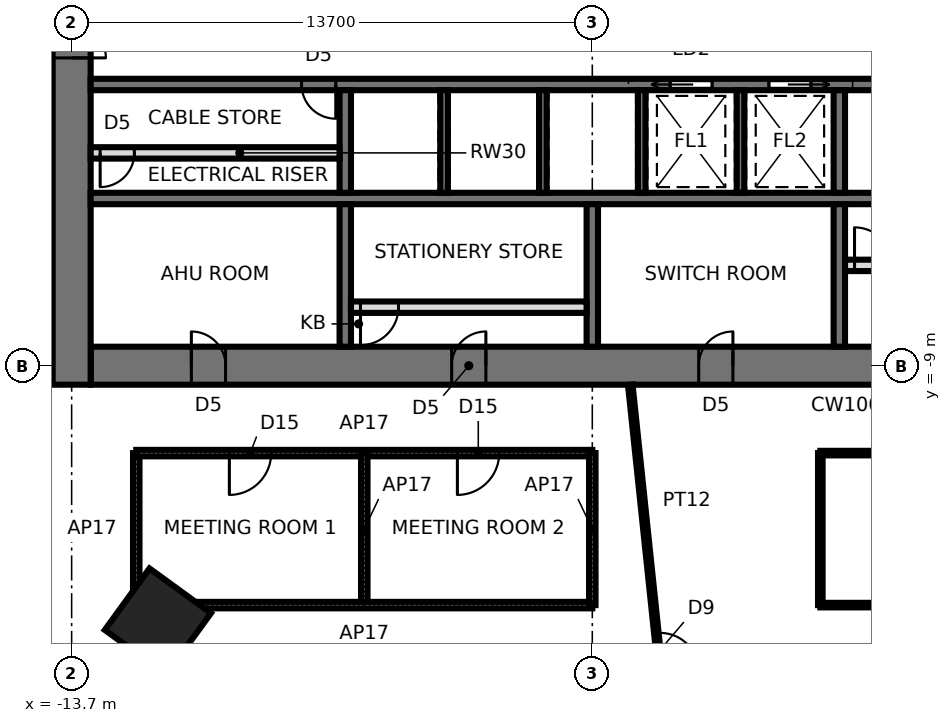
"""IFC4 building model, lengths in metres.
Left out: names, types, materials, properties, quantities, classifications, styles, units other than length and angle.
Written with IfcOpenShell. Run it as: python <this file> out.ifc"""

import sys

from ifc_helpers import new_model, si_unit, direction, frame, frame_2d, origin, origin_2d, place, context, subcontext, project, spatial, rectangle, extrude, element, fill, save


model = new_model("IFC4")
c1 = context("Model", 3, precision=1e-05, world=origin(), true_north=direction((0.0, 1.0)))
c2 = subcontext(c1, "Body", "Model", "MODEL_VIEW")
j1 = project(units=[si_unit("LENGTHUNIT", "METRE"), si_unit("PLANEANGLEUNIT", "RADIAN")], contexts=[c1])
p1 = place(None, origin())
s1 = spatial("IfcSite", under=j1, at=p1, CompositionType="ELEMENT")
p2 = place(p1, origin())
s2 = spatial("IfcBuilding", under=s1, at=p2, CompositionType="ELEMENT")
p3 = place(p2, frame((0.0, 0.0, 19.6)))
s3 = spatial("IfcBuildingStorey", under=s2, at=p3, CompositionType="ELEMENT", Elevation=19.6)
p4 = place(p3, frame((-11.43, -15.733, 0.0), z_axis=(0.0, 0.0, 1.0), x_axis=(-0.587785252292, -0.809016994375, 0.0)))
e1 = element("IfcColumn", 1, at=p4, inside=s3, PredefinedType="COLUMN", context=c2, shape_type="SweptSolid", body=[
    extrude(rectangle(XDim=2.0, YDim=2.0, at=origin_2d()), origin(), (0.0, 0.0, 1.0), 4.2),
])
p5 = place(p3, frame((-13.2, -9.0, 0.0), z_axis=(0.0, 0.0, 1.0), x_axis=(1.0, 0.0, 0.0)))
e2 = element("IfcWall", 2, at=p5, inside=s3, PredefinedType="SHEAR", context=c2, shape_type="SweptSolid", body=[
    extrude(rectangle(XDim=26.4, YDim=1.0, at=frame_2d((13.2, 0.0))), origin(), (0.0, 0.0, 1.0), 4.2),
])
p6 = place(p5, frame((2.65, 0.0, 0.0)))
e3 = element("IfcOpeningElement", 3, at=p6, cuts=e2, PredefinedType="OPENING", context=c2, shape_type="SweptSolid", body=[
    extrude(rectangle(XDim=0.9, YDim=2.1, at=frame_2d((0.45, 1.05))), frame((0.0, 0.51, 0.0), z_axis=(0.0, -1.0, 0.0), x_axis=(1.0, 0.0, 0.0)), (0.0, 0.0, 1.0), 1.02),
])
p7 = place(p5, frame((9.5, 0.0, 0.0)))
e4 = element("IfcOpeningElement", 4, at=p7, cuts=e2, PredefinedType="OPENING", context=c2, shape_type="SweptSolid", body=[
    extrude(rectangle(XDim=0.9, YDim=2.1, at=frame_2d((0.45, 1.05))), frame((0.0, 0.51, 0.0), z_axis=(0.0, -1.0, 0.0), x_axis=(1.0, 0.0, 0.0)), (0.0, 0.0, 1.0), 1.02),
])
p8 = place(p5, frame((16.0, 0.0, 0.0)))
e5 = element("IfcOpeningElement", 5, at=p8, cuts=e2, PredefinedType="OPENING", context=c2, shape_type="SweptSolid", body=[
    extrude(rectangle(XDim=0.9, YDim=2.1, at=frame_2d((0.45, 1.05))), frame((0.0, 0.51, 0.0), z_axis=(0.0, -1.0, 0.0), x_axis=(1.0, 0.0, 0.0)), (0.0, 0.0, 1.0), 1.02),
])
p9 = place(p5, frame((22.85, 0.0, 0.0)))
e6 = element("IfcOpeningElement", 6, at=p9, cuts=e2, PredefinedType="OPENING", context=c2, shape_type="SweptSolid", body=[
    extrude(rectangle(XDim=0.9, YDim=2.1, at=frame_2d((0.45, 1.05))), frame((0.0, 0.51, 0.0), z_axis=(0.0, -1.0, 0.0), x_axis=(1.0, 0.0, 0.0)), (0.0, 0.0, 1.0), 1.02),
])
p10 = place(p3, frame((-13.7, 9.5, 0.0), z_axis=(0.0, 0.0, 1.0), x_axis=(0.0, -1.0, 0.0)))
e7 = element("IfcWall", 7, at=p10, inside=s3, PredefinedType="SHEAR", context=c2, shape_type="SweptSolid", body=[
    extrude(rectangle(XDim=19.0, YDim=1.0, at=frame_2d((9.5, 0.0))), origin(), (0.0, 0.0, 1.0), 4.2),
])
p11 = place(p10, frame((8.6, 0.0, 0.0)))
e8 = element("IfcOpeningElement", 8, at=p11, cuts=e7, PredefinedType="OPENING", context=c2, shape_type="SweptSolid", body=[
    extrude(rectangle(XDim=1.8, YDim=2.4, at=frame_2d((0.9, 1.2))), frame((0.0, 0.51, 0.0), z_axis=(0.0, -1.0, 0.0), x_axis=(1.0, 0.0, 0.0)), (0.0, 0.0, 1.0), 1.02),
])
p12 = place(p3, frame((-13.2, -1.6, 0.0), z_axis=(0.0, 0.0, 1.0), x_axis=(1.0, 0.0, 0.0)))
e9 = element("IfcWall", 9, at=p12, inside=s3, PredefinedType="SHEAR", context=c2, shape_type="SweptSolid", body=[
    extrude(rectangle(XDim=26.4, YDim=0.3, at=frame_2d((13.2, 0.0))), origin(), (0.0, 0.0, 1.0), 4.2),
])
p13 = place(p12, frame((25.15, 0.0, 0.0)))
e10 = element("IfcOpeningElement", 10, at=p13, cuts=e9, PredefinedType="OPENING", context=c2, shape_type="SweptSolid", body=[
    extrude(rectangle(XDim=1.0, YDim=2.1, at=frame_2d((0.5, 1.05))), frame((0.0, 0.16, 0.0), z_axis=(0.0, -1.0, 0.0), x_axis=(1.0, 0.0, 0.0)), (0.0, 0.0, 1.0), 0.32),
])
p14 = place(p12, frame((15.25, 0.0, 0.0)))
e11 = element("IfcOpeningElement", 11, at=p14, cuts=e9, PredefinedType="OPENING", context=c2, shape_type="SweptSolid", body=[
    extrude(rectangle(XDim=1.1, YDim=2.3, at=frame_2d((0.55, 1.15))), frame((0.0, 0.16, 0.0), z_axis=(0.0, -1.0, 0.0), x_axis=(1.0, 0.0, 0.0)), (0.0, 0.0, 1.0), 0.32),
])
p15 = place(p12, frame((17.85, 0.0, 0.0)))
e12 = element("IfcOpeningElement", 12, at=p15, cuts=e9, PredefinedType="OPENING", context=c2, shape_type="SweptSolid", body=[
    extrude(rectangle(XDim=1.1, YDim=2.3, at=frame_2d((0.55, 1.15))), frame((0.0, 0.16, 0.0), z_axis=(0.0, -1.0, 0.0), x_axis=(1.0, 0.0, 0.0)), (0.0, 0.0, 1.0), 0.32),
])
p16 = place(p12, frame((5.55, 0.0, 0.0)))
e13 = element("IfcOpeningElement", 13, at=p16, cuts=e9, PredefinedType="OPENING", context=c2, shape_type="SweptSolid", body=[
    extrude(rectangle(XDim=0.9, YDim=2.1, at=frame_2d((0.45, 1.05))), frame((0.0, 0.16, 0.0), z_axis=(0.0, -1.0, 0.0), x_axis=(1.0, 0.0, 0.0)), (0.0, 0.0, 1.0), 0.32),
])
p17 = place(p3, frame((-13.2, -4.6, 0.0), z_axis=(0.0, 0.0, 1.0), x_axis=(1.0, 0.0, 0.0)))
e14 = element("IfcWall", 14, at=p17, inside=s3, PredefinedType="SHEAR", context=c2, shape_type="SweptSolid", body=[
    extrude(rectangle(XDim=26.4, YDim=0.3, at=frame_2d((13.2, 0.0))), origin(), (0.0, 0.0, 1.0), 4.2),
])
p18 = place(p3, frame((-6.5, -1.75, 0.0), z_axis=(0.0, 0.0, 1.0), x_axis=(0.0, -1.0, 0.0)))
e15 = element("IfcWall", 15, at=p18, inside=s3, PredefinedType="SHEAR", context=c2, shape_type="SweptSolid", body=[
    extrude(rectangle(XDim=2.7, YDim=0.3, at=frame_2d((1.35, 0.0))), origin(), (0.0, 0.0, 1.0), 4.2),
])
p19 = place(p3, frame((-6.5, -4.75, 0.0), z_axis=(0.0, 0.0, 1.0), x_axis=(0.0, -1.0, 0.0)))
e16 = element("IfcWall", 16, at=p19, inside=s3, PredefinedType="SHEAR", context=c2, shape_type="SweptSolid", body=[
    extrude(rectangle(XDim=3.75, YDim=0.3, at=frame_2d((1.875, 0.0))), origin(), (0.0, 0.0, 1.0), 4.2),
])
p20 = place(p3, frame((6.5, -1.75, 0.0), z_axis=(0.0, 0.0, 1.0), x_axis=(0.0, -1.0, 0.0)))
e17 = element("IfcWall", 17, at=p20, inside=s3, PredefinedType="SHEAR", context=c2, shape_type="SweptSolid", body=[
    extrude(rectangle(XDim=2.7, YDim=0.3, at=frame_2d((1.35, 0.0))), origin(), (0.0, 0.0, 1.0), 4.2),
])
p21 = place(p3, frame((6.5, -4.75, 0.0), z_axis=(0.0, 0.0, 1.0), x_axis=(0.0, -1.0, 0.0)))
e18 = element("IfcWall", 18, at=p21, inside=s3, PredefinedType="SHEAR", context=c2, shape_type="SweptSolid", body=[
    extrude(rectangle(XDim=3.75, YDim=0.3, at=frame_2d((1.875, 0.0))), origin(), (0.0, 0.0, 1.0), 4.2),
])
for number, where, z_axis, x_axis in (
    (19, (-3.9, -1.75, 0.0), (0.0, 0.0, 1.0), (0.0, -1.0, 0.0)),
    (20, (-1.3, -1.75, 0.0), (0.0, 0.0, 1.0), (0.0, -1.0, 0.0)),
    (21, (1.3, -1.75, 0.0), (0.0, 0.0, 1.0), (0.0, -1.0, 0.0)),
    (22, (3.9, -1.75, 0.0), (0.0, 0.0, 1.0), (0.0, -1.0, 0.0)),
):
    element("IfcWall", number, at=place(p3, frame(where, z_axis=z_axis, x_axis=x_axis)), inside=s3, PredefinedType="SHEAR", context=c2, shape_type="SweptSolid", body=[
        extrude(rectangle(XDim=2.7, YDim=0.2, at=frame_2d((1.35, 0.0))), origin(), (0.0, 0.0, 1.0), 4.2),
    ])
p22 = place(p3, frame((0.0, -4.75, 0.0), z_axis=(0.0, 0.0, 1.0), x_axis=(0.0, -1.0, 0.0)))
e23 = element("IfcWall", 23, at=p22, inside=s3, PredefinedType="SHEAR", context=c2, shape_type="SweptSolid", body=[
    extrude(rectangle(XDim=3.75, YDim=0.3, at=frame_2d((1.875, 0.0))), origin(), (0.0, 0.0, 1.0), 4.2),
])
p23 = place(p3, frame((-6.35, -7.46, 0.0), z_axis=(0.0, 0.0, 1.0), x_axis=(1.0, 0.0, 0.0)))
e24 = element("IfcWall", 24, at=p23, inside=s3, PredefinedType="PARTITIONING", context=c2, shape_type="SweptSolid", body=[
    extrude(rectangle(XDim=6.2, YDim=0.3, at=frame_2d((3.1, 0.0))), origin(), (0.0, 0.0, 1.0), 4.04),
])
p24 = place(p23, frame((0.25, 0.0, 0.0)))
e25 = element("IfcOpeningElement", 25, at=p24, cuts=e24, PredefinedType="OPENING", context=c2, shape_type="SweptSolid", body=[
    extrude(rectangle(XDim=1.0, YDim=2.4, at=frame_2d((0.5, 1.2))), frame((0.0, 0.16, 0.0), z_axis=(0.0, -1.0, 0.0), x_axis=(1.0, 0.0, 0.0)), (0.0, 0.0, 1.0), 0.32),
])
p25 = place(p3, frame((6.65, -6.36, 0.0), z_axis=(0.0, 0.0, 1.0), x_axis=(1.0, 0.0, 0.0)))
e26 = element("IfcWall", 26, at=p25, inside=s3, PredefinedType="PARTITIONING", context=c2, shape_type="SweptSolid", body=[
    extrude(rectangle(XDim=6.55, YDim=0.3, at=frame_2d((3.275, 0.0))), origin(), (0.0, 0.0, 1.0), 4.04),
])
p26 = place(p25, frame((0.25, 0.0, 0.0)))
e27 = element("IfcOpeningElement", 27, at=p26, cuts=e26, PredefinedType="OPENING", context=c2, shape_type="SweptSolid", body=[
    extrude(rectangle(XDim=1.0, YDim=2.4, at=frame_2d((0.5, 1.2))), frame((0.0, 0.16, 0.0), z_axis=(0.0, -1.0, 0.0), x_axis=(1.0, 0.0, 0.0)), (0.0, 0.0, 1.0), 0.32),
])
p27 = place(p3, frame((-13.2, -3.4, 0.0), z_axis=(0.0, 0.0, 1.0), x_axis=(1.0, 0.0, 0.0)))
e28 = element("IfcWall", 28, at=p27, inside=s3, PredefinedType="SOLIDWALL", context=c2, shape_type="SweptSolid", body=[
    extrude(rectangle(XDim=6.55, YDim=0.3, at=frame_2d((3.275, 0.0))), origin(), (0.0, 0.0, 1.0), 4.04),
])
p28 = place(p27, frame((0.25, 0.0, 0.0)))
e29 = element("IfcOpeningElement", 29, at=p28, cuts=e28, PredefinedType="OPENING", context=c2, shape_type="SweptSolid", body=[
    extrude(rectangle(XDim=0.9, YDim=2.1, at=frame_2d((0.45, 1.05))), frame((0.0, 0.16, 0.0), z_axis=(0.0, -1.0, 0.0), x_axis=(1.0, 0.0, 0.0)), (0.0, 0.0, 1.0), 0.32),
])
p29 = place(p3, frame((-12.0, -15.3, 0.0), z_axis=(0.0, 0.0, 1.0), x_axis=(0.0, 1.0, 0.0)))
e30 = element("IfcWall", 30, at=p29, inside=s3, PredefinedType="PARTITIONING", context=c2, shape_type="SweptSolid", body=[
    extrude(rectangle(XDim=4.0, YDim=0.17, at=frame_2d((2.0, 0.0))), origin(), (0.0, 0.0, 1.0), 4.04),
])
p30 = place(p3, frame((-12.0, -11.3, 0.0), z_axis=(0.0, 0.0, 1.0), x_axis=(1.0, 0.0, 0.0)))
e31 = element("IfcWall", 31, at=p30, inside=s3, PredefinedType="PARTITIONING", context=c2, shape_type="SweptSolid", body=[
    extrude(rectangle(XDim=12.0, YDim=0.17, at=frame_2d((6.0, 0.0))), origin(), (0.0, 0.0, 1.0), 4.04),
])
p31 = place(p30, frame((2.45, 0.0, 0.0)))
e32 = element("IfcOpeningElement", 32, at=p31, cuts=e31, PredefinedType="OPENING", context=c2, shape_type="SweptSolid", body=[
    extrude(rectangle(XDim=1.1, YDim=2.4, at=frame_2d((0.55, 1.2))), frame((0.0, 0.095, 0.0), z_axis=(0.0, -1.0, 0.0), x_axis=(1.0, 0.0, 0.0)), (0.0, 0.0, 1.0), 0.19),
])
p32 = place(p30, frame((8.45, 0.0, 0.0)))
e33 = element("IfcOpeningElement", 33, at=p32, cuts=e31, PredefinedType="OPENING", context=c2, shape_type="SweptSolid", body=[
    extrude(rectangle(XDim=1.1, YDim=2.4, at=frame_2d((0.55, 1.2))), frame((0.0, 0.095, 0.0), z_axis=(0.0, -1.0, 0.0), x_axis=(1.0, 0.0, 0.0)), (0.0, 0.0, 1.0), 0.19),
])
p33 = place(p3, frame((-6.0, -11.3, 0.0), z_axis=(0.0, 0.0, 1.0), x_axis=(0.0, -1.0, 0.0)))
e34 = element("IfcWall", 34, at=p33, inside=s3, PredefinedType="PARTITIONING", context=c2, shape_type="SweptSolid", body=[
    extrude(rectangle(XDim=4.0, YDim=0.17, at=frame_2d((2.0, 0.0))), origin(), (0.0, 0.0, 1.0), 4.04),
])
p34 = place(p3, frame((0.0, -15.3, 0.0), z_axis=(0.0, 0.0, 1.0), x_axis=(-1.0, 0.0, 0.0)))
e35 = element("IfcWall", 35, at=p34, inside=s3, PredefinedType="PARTITIONING", context=c2, shape_type="SweptSolid", body=[
    extrude(rectangle(XDim=12.0, YDim=0.17, at=frame_2d((6.0, 0.0))), origin(), (0.0, 0.0, 1.0), 3.586),
])
p35 = place(p3, frame((0.0, -11.3, 0.0), z_axis=(0.0, 0.0, 1.0), x_axis=(0.0, -1.0, 0.0)))
e36 = element("IfcWall", 36, at=p35, inside=s3, PredefinedType="PARTITIONING", context=c2, shape_type="SweptSolid", body=[
    extrude(rectangle(XDim=4.0, YDim=0.17, at=frame_2d((2.0, 0.0))), origin(), (0.0, 0.0, 1.0), 2.84),
])
p36 = place(p3, frame((2.472, -23.521, 0.0), z_axis=(0.0, 0.0, 1.0), x_axis=(-0.104529730385, 0.994521762188, 0.0)))
e37 = element("IfcWall", 37, at=p36, inside=s3, PredefinedType="PARTITIONING", context=c2, shape_type="SweptSolid", body=[
    extrude(rectangle(XDim=14.098, YDim=0.12, at=frame_2d((7.049, 0.0))), origin(), (0.0, 0.0, 1.0), 4.04),
])
p37 = place(p36, frame((6.524, 0.0, 0.0)))
e38 = element("IfcOpeningElement", 38, at=p37, cuts=e37, PredefinedType="OPENING", context=c2, shape_type="SweptSolid", body=[
    extrude(rectangle(XDim=1.0, YDim=2.4, at=frame_2d((0.5, 1.2))), frame((0.0, 0.07, 0.0), z_axis=(0.0, -1.0, 0.0), x_axis=(1.0, 0.0, 0.0)), (0.0, 0.0, 1.0), 0.14),
])
p38 = place(p3, frame((6.0, -15.3, 0.0), z_axis=(0.0, 0.0, 1.0), x_axis=(0.0, 1.0, 0.0)))
e39 = element("IfcWall", 39, at=p38, inside=s3, PredefinedType="PARTITIONING", context=c2, shape_type="SweptSolid", body=[
    extrude(rectangle(XDim=4.0, YDim=0.12, at=frame_2d((2.0, 0.0))), origin(), (0.0, 0.0, 1.0), 4.04),
])
p39 = place(p3, frame((12.0, -15.3, 0.0), z_axis=(0.0, 0.0, 1.0), x_axis=(-1.0, 0.0, 0.0)))
e40 = element("IfcWall", 40, at=p39, inside=s3, PredefinedType="PARTITIONING", context=c2, shape_type="SweptSolid", body=[
    extrude(rectangle(XDim=6.0, YDim=0.12, at=frame_2d((3.0, 0.0))), origin(), (0.0, 0.0, 1.0), 4.04),
])
p40 = place(p39, frame((2.5, 0.0, 0.0)))
e41 = element("IfcOpeningElement", 41, at=p40, cuts=e40, PredefinedType="OPENING", context=c2, shape_type="SweptSolid", body=[
    extrude(rectangle(XDim=1.0, YDim=2.4, at=frame_2d((0.5, 1.2))), frame((0.0, 0.07, 0.0), z_axis=(0.0, -1.0, 0.0), x_axis=(1.0, 0.0, 0.0)), (0.0, 0.0, 1.0), 0.14),
])
p41 = place(p3, frame((6.0, -11.3, 0.0), z_axis=(0.0, 0.0, 1.0), x_axis=(1.0, 0.0, 0.0)))
e42 = element("IfcWall", 42, at=p41, inside=s3, PredefinedType="PARTITIONING", context=c2, shape_type="SweptSolid", body=[
    extrude(rectangle(XDim=6.0, YDim=0.12, at=frame_2d((3.0, 0.0))), origin(), (0.0, 0.0, 1.0), 4.04),
])
p42 = place(p11, origin())
e43 = element("IfcDoor", 43, at=p42, inside=s3, OperationType="DOUBLE_DOOR_SINGLE_SWING", PredefinedType="DOOR", context=c2, shape_type="SweptSolid", body=[
    extrude(rectangle(XDim=1.72, YDim=2.36, at=frame_2d((0.9, 1.18))), frame((0.0, 0.025, 0.0), z_axis=(0.0, -1.0, 0.0), x_axis=(1.0, 0.0, 0.0)), (0.0, 0.0, 1.0), 0.05),
    extrude(rectangle(XDim=0.04, YDim=2.4, at=frame_2d((0.02, 1.2))), frame((0.0, 0.25, 0.0), z_axis=(0.0, -1.0, 0.0), x_axis=(1.0, 0.0, 0.0)), (0.0, 0.0, 1.0), 0.5),
    extrude(rectangle(XDim=0.04, YDim=2.4, at=frame_2d((1.78, 1.2))), frame((0.0, 0.25, 0.0), z_axis=(0.0, -1.0, 0.0), x_axis=(1.0, 0.0, 0.0)), (0.0, 0.0, 1.0), 0.5),
    extrude(rectangle(XDim=1.72, YDim=0.04, at=frame_2d((0.9, 2.38))), frame((0.0, 0.25, 0.0), z_axis=(0.0, -1.0, 0.0), x_axis=(1.0, 0.0, 0.0)), (0.0, 0.0, 1.0), 0.5),
])
fill(e8, e43)
p43 = place(p14, frame((1.1, 0.0, 0.0), z_axis=(0.0, 0.0, 1.0), x_axis=(-1.0, 0.0, 0.0)))
e44 = element("IfcDoor", 44, at=p43, inside=s3, OperationType="SLIDING_TO_RIGHT", PredefinedType="DOOR", context=c2, shape_type="SweptSolid", body=[
    extrude(rectangle(XDim=1.1, YDim=2.3, at=frame_2d((0.55, 1.15))), frame((0.0, 0.025, 0.0), z_axis=(0.0, -1.0, 0.0), x_axis=(1.0, 0.0, 0.0)), (0.0, 0.0, 1.0), 0.05),
])
fill(e11, e44)
p44 = place(p15, frame((1.1, 0.0, 0.0), z_axis=(0.0, 0.0, 1.0), x_axis=(-1.0, 0.0, 0.0)))
e45 = element("IfcDoor", 45, at=p44, inside=s3, OperationType="SLIDING_TO_LEFT", PredefinedType="DOOR", context=c2, shape_type="SweptSolid", body=[
    extrude(rectangle(XDim=1.1, YDim=2.3, at=frame_2d((0.55, 1.15))), frame((0.0, 0.025, 0.0), z_axis=(0.0, -1.0, 0.0), x_axis=(1.0, 0.0, 0.0)), (0.0, 0.0, 1.0), 0.05),
])
fill(e12, e45)
p45 = place(p16, frame((0.9, 0.0, 0.0), z_axis=(0.0, 0.0, 1.0), x_axis=(-1.0, 0.0, 0.0)))
e46 = element("IfcDoor", 46, at=p45, inside=s3, OperationType="SINGLE_SWING_LEFT", PredefinedType="DOOR", context=c2, shape_type="SweptSolid", body=[
    extrude(rectangle(XDim=0.9, YDim=2.1, at=frame_2d((0.45, 1.05))), frame((0.0, 0.025, 0.0), z_axis=(0.0, -1.0, 0.0), x_axis=(1.0, 0.0, 0.0)), (0.0, 0.0, 1.0), 0.05),
])
fill(e13, e46)
p46 = place(p6, origin())
e47 = element("IfcDoor", 47, at=p46, inside=s3, OperationType="SINGLE_SWING_LEFT", PredefinedType="DOOR", context=c2, shape_type="SweptSolid", body=[
    extrude(rectangle(XDim=0.82, YDim=2.06, at=frame_2d((0.45, 1.03))), frame((0.0, 0.025, 0.0), z_axis=(0.0, -1.0, 0.0), x_axis=(1.0, 0.0, 0.0)), (0.0, 0.0, 1.0), 0.05),
    extrude(rectangle(XDim=0.04, YDim=2.1, at=frame_2d((0.02, 1.05))), frame((0.0, 0.25, 0.0), z_axis=(0.0, -1.0, 0.0), x_axis=(1.0, 0.0, 0.0)), (0.0, 0.0, 1.0), 0.5),
    extrude(rectangle(XDim=0.04, YDim=2.1, at=frame_2d((0.88, 1.05))), frame((0.0, 0.25, 0.0), z_axis=(0.0, -1.0, 0.0), x_axis=(1.0, 0.0, 0.0)), (0.0, 0.0, 1.0), 0.5),
    extrude(rectangle(XDim=0.82, YDim=0.04, at=frame_2d((0.45, 2.08))), frame((0.0, 0.25, 0.0), z_axis=(0.0, -1.0, 0.0), x_axis=(1.0, 0.0, 0.0)), (0.0, 0.0, 1.0), 0.5),
])
fill(e3, e47)
p47 = place(p7, origin())
e48 = element("IfcDoor", 48, at=p47, inside=s3, OperationType="SINGLE_SWING_RIGHT", PredefinedType="DOOR", context=c2, shape_type="SweptSolid", body=[
    extrude(rectangle(XDim=0.82, YDim=2.06, at=frame_2d((0.45, 1.03))), frame((0.0, 0.025, 0.0), z_axis=(0.0, -1.0, 0.0), x_axis=(1.0, 0.0, 0.0)), (0.0, 0.0, 1.0), 0.05),
    extrude(rectangle(XDim=0.04, YDim=2.1, at=frame_2d((0.02, 1.05))), frame((0.0, 0.25, 0.0), z_axis=(0.0, -1.0, 0.0), x_axis=(1.0, 0.0, 0.0)), (0.0, 0.0, 1.0), 0.5),
    extrude(rectangle(XDim=0.04, YDim=2.1, at=frame_2d((0.88, 1.05))), frame((0.0, 0.25, 0.0), z_axis=(0.0, -1.0, 0.0), x_axis=(1.0, 0.0, 0.0)), (0.0, 0.0, 1.0), 0.5),
    extrude(rectangle(XDim=0.82, YDim=0.04, at=frame_2d((0.45, 2.08))), frame((0.0, 0.25, 0.0), z_axis=(0.0, -1.0, 0.0), x_axis=(1.0, 0.0, 0.0)), (0.0, 0.0, 1.0), 0.5),
])
fill(e4, e48)
p48 = place(p8, origin())
e49 = element("IfcDoor", 49, at=p48, inside=s3, OperationType="SINGLE_SWING_RIGHT", PredefinedType="DOOR", context=c2, shape_type="SweptSolid", body=[
    extrude(rectangle(XDim=0.82, YDim=2.06, at=frame_2d((0.45, 1.03))), frame((0.0, 0.025, 0.0), z_axis=(0.0, -1.0, 0.0), x_axis=(1.0, 0.0, 0.0)), (0.0, 0.0, 1.0), 0.05),
    extrude(rectangle(XDim=0.04, YDim=2.1, at=frame_2d((0.02, 1.05))), frame((0.0, 0.25, 0.0), z_axis=(0.0, -1.0, 0.0), x_axis=(1.0, 0.0, 0.0)), (0.0, 0.0, 1.0), 0.5),
    extrude(rectangle(XDim=0.04, YDim=2.1, at=frame_2d((0.88, 1.05))), frame((0.0, 0.25, 0.0), z_axis=(0.0, -1.0, 0.0), x_axis=(1.0, 0.0, 0.0)), (0.0, 0.0, 1.0), 0.5),
    extrude(rectangle(XDim=0.82, YDim=0.04, at=frame_2d((0.45, 2.08))), frame((0.0, 0.25, 0.0), z_axis=(0.0, -1.0, 0.0), x_axis=(1.0, 0.0, 0.0)), (0.0, 0.0, 1.0), 0.5),
])
fill(e5, e49)
p49 = place(p24, frame((1.0, 0.0, 0.0), z_axis=(0.0, 0.0, 1.0), x_axis=(-1.0, 0.0, 0.0)))
e50 = element("IfcDoor", 50, at=p49, inside=s3, OperationType="SINGLE_SWING_RIGHT", PredefinedType="DOOR", context=c2, shape_type="SweptSolid", body=[
    extrude(rectangle(XDim=1.0, YDim=2.4, at=frame_2d((0.5, 1.2))), frame((0.0, 0.025, 0.0), z_axis=(0.0, -1.0, 0.0), x_axis=(1.0, 0.0, 0.0)), (0.0, 0.0, 1.0), 0.05),
])
fill(e25, e50)
p50 = place(p26, origin())
e51 = element("IfcDoor", 51, at=p50, inside=s3, OperationType="SINGLE_SWING_LEFT", PredefinedType="DOOR", context=c2, shape_type="SweptSolid", body=[
    extrude(rectangle(XDim=1.0, YDim=2.4, at=frame_2d((0.5, 1.2))), frame((0.0, 0.025, 0.0), z_axis=(0.0, -1.0, 0.0), x_axis=(1.0, 0.0, 0.0)), (0.0, 0.0, 1.0), 0.05),
])
fill(e27, e51)
p51 = place(p28, frame((0.9, 0.0, 0.0), z_axis=(0.0, 0.0, 1.0), x_axis=(-1.0, 0.0, 0.0)))
e52 = element("IfcDoor", 52, at=p51, inside=s3, OperationType="SINGLE_SWING_RIGHT", PredefinedType="DOOR", context=c2, shape_type="SweptSolid", body=[
    extrude(rectangle(XDim=0.9, YDim=2.1, at=frame_2d((0.45, 1.05))), frame((0.0, 0.025, 0.0), z_axis=(0.0, -1.0, 0.0), x_axis=(1.0, 0.0, 0.0)), (0.0, 0.0, 1.0), 0.05),
])
fill(e29, e52)
p52 = place(p31, frame((1.1, 0.0, 0.0), z_axis=(0.0, 0.0, 1.0), x_axis=(-1.0, 0.0, 0.0)))
e53 = element("IfcDoor", 53, at=p52, inside=s3, OperationType="SINGLE_SWING_RIGHT", PredefinedType="DOOR", context=c2, shape_type="SweptSolid", body=[
    extrude(rectangle(XDim=1.1, YDim=2.4, at=frame_2d((0.55, 1.2))), frame((0.0, 0.025, 0.0), z_axis=(0.0, -1.0, 0.0), x_axis=(1.0, 0.0, 0.0)), (0.0, 0.0, 1.0), 0.05),
])
fill(e32, e53)
p53 = place(p32, frame((1.1, 0.0, 0.0), z_axis=(0.0, 0.0, 1.0), x_axis=(-1.0, 0.0, 0.0)))
e54 = element("IfcDoor", 54, at=p53, inside=s3, OperationType="SINGLE_SWING_RIGHT", PredefinedType="DOOR", context=c2, shape_type="SweptSolid", body=[
    extrude(rectangle(XDim=1.1, YDim=2.4, at=frame_2d((0.55, 1.2))), frame((0.0, 0.025, 0.0), z_axis=(0.0, -1.0, 0.0), x_axis=(1.0, 0.0, 0.0)), (0.0, 0.0, 1.0), 0.05),
])
fill(e33, e54)
p54 = place(p37, frame((1.0, 0.0, 0.0), z_axis=(0.0, 0.0, 1.0), x_axis=(-1.0, 0.0, 0.0)))
e55 = element("IfcDoor", 55, at=p54, inside=s3, OperationType="SINGLE_SWING_RIGHT", PredefinedType="DOOR", context=c2, shape_type="SweptSolid", body=[
    extrude(rectangle(XDim=1.0, YDim=2.4, at=frame_2d((0.5, 1.2))), frame((0.0, 0.025, 0.0), z_axis=(0.0, -1.0, 0.0), x_axis=(1.0, 0.0, 0.0)), (0.0, 0.0, 1.0), 0.05),
])
fill(e38, e55)
save(model, sys.argv[1])
